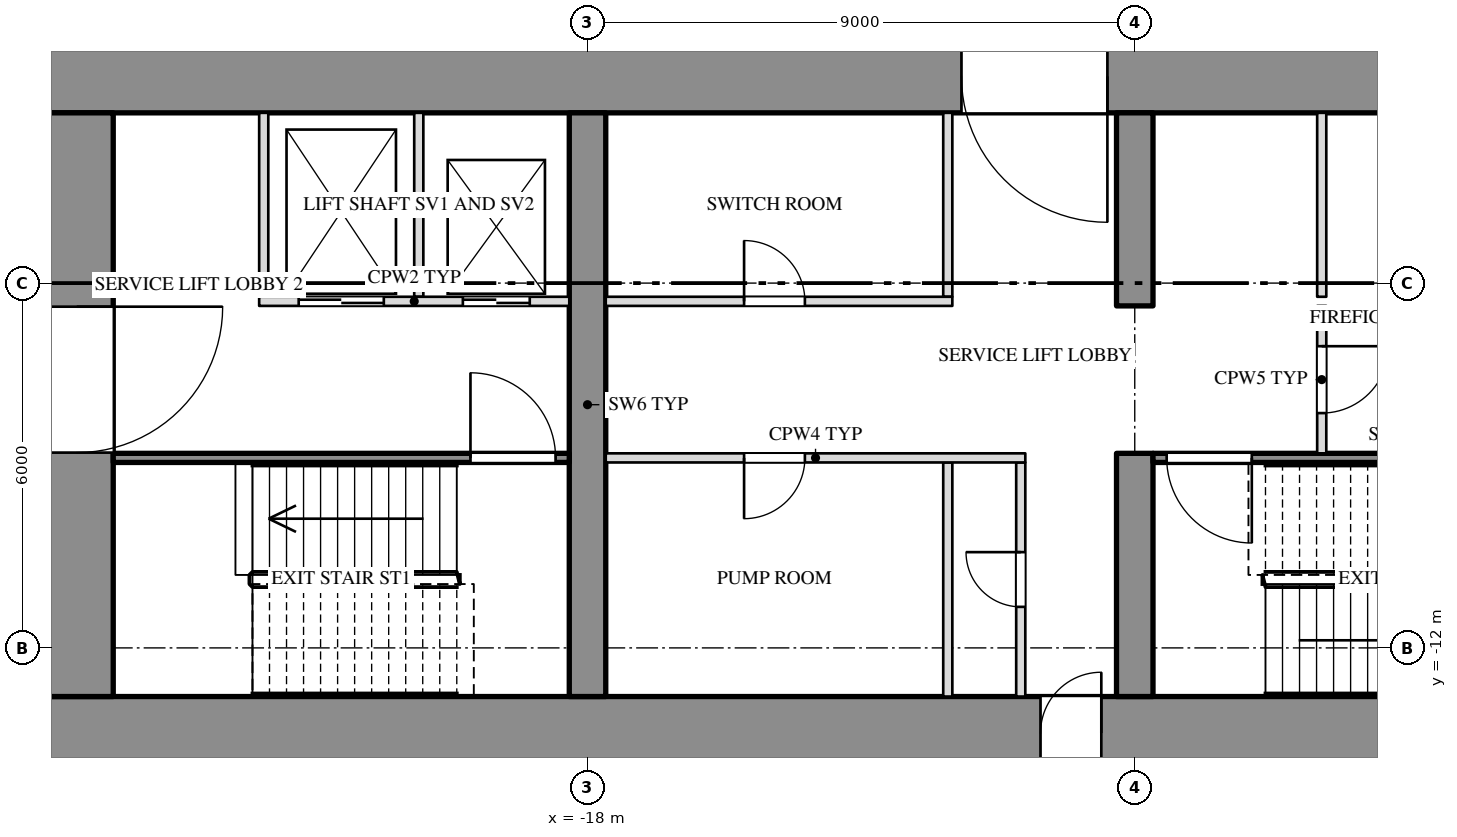
"""IFC4 building model, lengths in metres.
Left out: names, types, materials, properties, quantities, classifications, styles, units other than length and angle.
Written with IfcOpenShell. Run it as: python <this file> out.ifc"""

import sys

from ifc_helpers import new_model, si_unit, direction, frame, frame_2d, origin, place, context, subcontext, project, spatial, rectangle, extrude, element, fill, save


model = new_model("IFC4")
c1 = context("Model", 3, precision=1e-05, world=origin(), true_north=direction((0.0, 1.0)))
c2 = subcontext(c1, "Body", "Model", "MODEL_VIEW")
j1 = project(units=[si_unit("LENGTHUNIT", "METRE"), si_unit("PLANEANGLEUNIT", "RADIAN")], contexts=[c1])
p1 = place(None, origin())
s1 = spatial("IfcSite", under=j1, at=p1, CompositionType="ELEMENT")
p2 = place(p1, origin())
s2 = spatial("IfcBuilding", under=s1, at=p2, CompositionType="ELEMENT")
p3 = place(p2, frame((0.0, 0.0, -12.6)))
s3 = spatial("IfcBuildingStorey", under=s2, at=p3, CompositionType="ELEMENT", Elevation=-12.6)
p4 = place(p3, frame((-27.0, -2.6, 0.0), z_axis=(0.0, 0.0, 1.0), x_axis=(1.0, 0.0, 0.0)))
e1 = element("IfcWall", 1, at=p4, inside=s3, PredefinedType="SHEAR", context=c2, shape_type="SweptSolid", body=[
    extrude(rectangle(XDim=54.0, YDim=1.2, at=frame_2d((27.0, 0.0))), origin(), (0.0, 0.0, 1.0), 3.9),
])
p5 = place(p4, frame((15.15, 0.0, 0.0)))
e2 = element("IfcOpeningElement", 2, at=p5, cuts=e1, PredefinedType="OPENING", context=c2, shape_type="SweptSolid", body=[
    extrude(rectangle(XDim=2.4, YDim=2.1, at=frame_2d((1.2, 1.05))), frame((0.0, 0.612, 0.0), z_axis=(0.0, -1.0, 0.0), x_axis=(1.0, 0.0, 0.0)), (0.0, 0.0, 1.0), 1.224),
])
p6 = place(p4, frame((36.45, 0.0, 0.0)))
e3 = element("IfcOpeningElement", 3, at=p6, cuts=e1, PredefinedType="OPENING", context=c2, shape_type="SweptSolid", body=[
    extrude(rectangle(XDim=2.4, YDim=2.1, at=frame_2d((1.2, 1.05))), frame((0.0, 0.612, 0.0), z_axis=(0.0, -1.0, 0.0), x_axis=(1.0, 0.0, 0.0)), (0.0, 0.0, 1.0), 1.224),
])
p7 = place(p3, frame((-27.0, -13.4, 0.0), z_axis=(0.0, 0.0, 1.0), x_axis=(1.0, 0.0, 0.0)))
e4 = element("IfcWall", 4, at=p7, inside=s3, PredefinedType="SHEAR", context=c2, shape_type="SweptSolid", body=[
    extrude(rectangle(XDim=54.0, YDim=1.2, at=frame_2d((27.0, 0.0))), origin(), (0.0, 0.0, 1.0), 3.9),
])
p8 = place(p7, frame((16.45, 0.0, 0.0)))
e5 = element("IfcOpeningElement", 5, at=p8, cuts=e4, PredefinedType="OPENING", context=c2, shape_type="SweptSolid", body=[
    extrude(rectangle(XDim=1.0, YDim=2.1, at=frame_2d((0.5, 1.05))), frame((0.0, 0.612, 0.0), z_axis=(0.0, -1.0, 0.0), x_axis=(1.0, 0.0, 0.0)), (0.0, 0.0, 1.0), 1.224),
])
p9 = place(p7, frame((36.55, 0.0, 0.0)))
e6 = element("IfcOpeningElement", 6, at=p9, cuts=e4, PredefinedType="OPENING", context=c2, shape_type="SweptSolid", body=[
    extrude(rectangle(XDim=1.0, YDim=2.1, at=frame_2d((0.5, 1.05))), frame((0.0, 0.612, 0.0), z_axis=(0.0, -1.0, 0.0), x_axis=(1.0, 0.0, 0.0)), (0.0, 0.0, 1.0), 1.224),
])
p10 = place(p3, frame((-26.4, -12.8, 0.0), z_axis=(0.0, 0.0, 1.0), x_axis=(0.0, 1.0, 0.0)))
e7 = element("IfcWall", 7, at=p10, inside=s3, PredefinedType="SHEAR", context=c2, shape_type="SweptSolid", body=[
    extrude(rectangle(XDim=9.6, YDim=1.2, at=frame_2d((4.8, 0.0))), origin(), (0.0, 0.0, 1.0), 3.9),
])
p11 = place(p10, frame((4.012, 0.0, 0.0)))
e8 = element("IfcOpeningElement", 8, at=p11, cuts=e7, PredefinedType="OPENING", context=c2, shape_type="SweptSolid", body=[
    extrude(rectangle(XDim=2.4, YDim=2.1, at=frame_2d((1.2, 1.05))), frame((0.0, 0.612, 0.0), z_axis=(0.0, -1.0, 0.0), x_axis=(1.0, 0.0, 0.0)), (0.0, 0.0, 1.0), 1.224),
])
p12 = place(p3, frame((-18.0, -12.8, 0.0), z_axis=(0.0, 0.0, 1.0), x_axis=(0.0, 1.0, 0.0)))
e9 = element("IfcWall", 9, at=p12, inside=s3, PredefinedType="SHEAR", context=c2, shape_type="SweptSolid", body=[
    extrude(rectangle(XDim=9.6, YDim=0.6, at=frame_2d((4.8, 0.0))), origin(), (0.0, 0.0, 1.0), 3.9),
])
p13 = place(p3, frame((-9.0, -12.8, 0.0), z_axis=(0.0, 0.0, 1.0), x_axis=(0.0, 1.0, 0.0)))
e10 = element("IfcWall", 10, at=p13, inside=s3, PredefinedType="SHEAR", context=c2, shape_type="SweptSolid", body=[
    extrude(rectangle(XDim=4.0, YDim=0.6, at=frame_2d((2.0, 0.0))), origin(), (0.0, 0.0, 1.0), 3.9),
])
p14 = place(p3, frame((-9.0, -6.375, 0.0), z_axis=(0.0, 0.0, 1.0), x_axis=(0.0, 1.0, 0.0)))
e11 = element("IfcWall", 11, at=p14, inside=s3, PredefinedType="SHEAR", context=c2, shape_type="SweptSolid", body=[
    extrude(rectangle(XDim=3.175, YDim=0.6, at=frame_2d((1.587, 0.0))), origin(), (0.0, 0.0, 1.0), 3.9),
])
for number, where, z_axis, x_axis in (
    (12, (-20.775, -6.225, 0.0), (0.0, 0.0, 1.0), (0.0, 1.0, 0.0)),
    (13, (-23.325, -6.225, 0.0), (0.0, 0.0, 1.0), (0.0, 1.0, 0.0)),
    (14, (-12.075, -6.225, 0.0), (0.0, 0.0, 1.0), (0.0, 1.0, 0.0)),
    (15, (-5.925, -6.225, 0.0), (0.0, 0.0, 1.0), (0.0, 1.0, 0.0)),
):
    element("IfcWall", number, at=place(p3, frame(where, z_axis=z_axis, x_axis=x_axis)), inside=s3, PredefinedType="PARTITIONING", context=c2, shape_type="SweptSolid", body=[
        extrude(rectangle(XDim=3.025, YDim=0.15, at=frame_2d((1.513, 0.0))), origin(), (0.0, 0.0, 1.0), 3.9),
    ])
p15 = place(p3, frame((-10.875, -12.8, 0.0), z_axis=(0.0, 0.0, 1.0), x_axis=(0.0, 1.0, 0.0)))
e16 = element("IfcWall", 16, at=p15, inside=s3, PredefinedType="PARTITIONING", context=c2, shape_type="SweptSolid", body=[
    extrude(rectangle(XDim=3.85, YDim=0.15, at=frame_2d((1.925, 0.0))), origin(), (0.0, 0.0, 1.0), 3.9),
])
p16 = place(p15, frame((1.475, 0.0, 0.0)))
e17 = element("IfcOpeningElement", 17, at=p16, cuts=e16, PredefinedType="OPENING", context=c2, shape_type="SweptSolid", body=[
    extrude(rectangle(XDim=0.9, YDim=2.1, at=frame_2d((0.45, 1.05))), frame((0.0, 0.087, 0.0), z_axis=(0.0, -1.0, 0.0), x_axis=(1.0, 0.0, 0.0)), (0.0, 0.0, 1.0), 0.174),
])
p17 = place(p3, frame((-12.075, -12.8, 0.0), z_axis=(0.0, 0.0, 1.0), x_axis=(0.0, 1.0, 0.0)))
e18 = element("IfcWall", 18, at=p17, inside=s3, PredefinedType="PARTITIONING", context=c2, shape_type="SweptSolid", body=[
    extrude(rectangle(XDim=3.85, YDim=0.15, at=frame_2d((1.925, 0.0))), origin(), (0.0, 0.0, 1.0), 3.9),
])
p18 = place(p3, frame((-5.925, -8.8, 0.0), z_axis=(0.0, 0.0, 1.0), x_axis=(0.0, 1.0, 0.0)))
e19 = element("IfcWall", 19, at=p18, inside=s3, PredefinedType="PARTITIONING", context=c2, shape_type="SweptSolid", body=[
    extrude(rectangle(XDim=2.425, YDim=0.15, at=frame_2d((1.212, 0.0))), origin(), (0.0, 0.0, 1.0), 3.9),
])
p19 = place(p18, frame((0.662, 0.0, 0.0)))
e20 = element("IfcOpeningElement", 20, at=p19, cuts=e19, PredefinedType="OPENING", context=c2, shape_type="SweptSolid", body=[
    extrude(rectangle(XDim=1.1, YDim=2.1, at=frame_2d((0.55, 1.05))), frame((0.0, 0.087, 0.0), z_axis=(0.0, -1.0, 0.0), x_axis=(1.0, 0.0, 0.0)), (0.0, 0.0, 1.0), 0.174),
])
p20 = place(p3, frame((-23.4, -6.3, 0.0), z_axis=(0.0, 0.0, 1.0), x_axis=(1.0, 0.0, 0.0)))
e21 = element("IfcWall", 21, at=p20, inside=s3, PredefinedType="PARTITIONING", context=c2, shape_type="SweptSolid", body=[
    extrude(rectangle(XDim=5.1, YDim=0.15, at=frame_2d((2.55, 0.0))), origin(), (0.0, 0.0, 1.0), 3.9),
])
p21 = place(p20, frame((0.65, 0.0, 0.0)))
e22 = element("IfcOpeningElement", 22, at=p21, cuts=e21, PredefinedType="OPENING", context=c2, shape_type="SweptSolid", body=[
    extrude(rectangle(XDim=1.4, YDim=2.1, at=frame_2d((0.7, 1.05))), frame((0.0, 0.087, 0.0), z_axis=(0.0, -1.0, 0.0), x_axis=(1.0, 0.0, 0.0)), (0.0, 0.0, 1.0), 0.174),
])
p22 = place(p20, frame((3.35, 0.0, 0.0)))
e23 = element("IfcOpeningElement", 23, at=p22, cuts=e21, PredefinedType="OPENING", context=c2, shape_type="SweptSolid", body=[
    extrude(rectangle(XDim=1.1, YDim=2.1, at=frame_2d((0.55, 1.05))), frame((0.0, 0.087, 0.0), z_axis=(0.0, -1.0, 0.0), x_axis=(1.0, 0.0, 0.0)), (0.0, 0.0, 1.0), 0.174),
])
p23 = place(p3, frame((-17.7, -6.3, 0.0), z_axis=(0.0, 0.0, 1.0), x_axis=(1.0, 0.0, 0.0)))
e24 = element("IfcWall", 24, at=p23, inside=s3, PredefinedType="PARTITIONING", context=c2, shape_type="SweptSolid", body=[
    extrude(rectangle(XDim=5.7, YDim=0.15, at=frame_2d((2.85, 0.0))), origin(), (0.0, 0.0, 1.0), 3.9),
])
p24 = place(p23, frame((2.275, 0.0, 0.0)))
e25 = element("IfcOpeningElement", 25, at=p24, cuts=e24, PredefinedType="OPENING", context=c2, shape_type="SweptSolid", body=[
    extrude(rectangle(XDim=1.0, YDim=2.1, at=frame_2d((0.5, 1.05))), frame((0.0, 0.087, 0.0), z_axis=(0.0, -1.0, 0.0), x_axis=(1.0, 0.0, 0.0)), (0.0, 0.0, 1.0), 0.174),
])
p25 = place(p3, frame((-25.8, -8.875, 0.0), z_axis=(0.0, 0.0, 1.0), x_axis=(1.0, 0.0, 0.0)))
e26 = element("IfcWall", 26, at=p25, inside=s3, PredefinedType="SHEAR", context=c2, shape_type="SweptSolid", body=[
    extrude(rectangle(XDim=7.5, YDim=0.15, at=frame_2d((3.75, 0.0))), origin(), (0.0, 0.0, 1.0), 3.9),
])
p26 = place(p25, frame((5.875, 0.0, 0.0)))
e27 = element("IfcOpeningElement", 27, at=p26, cuts=e26, PredefinedType="OPENING", context=c2, shape_type="SweptSolid", body=[
    extrude(rectangle(XDim=1.4, YDim=2.1, at=frame_2d((0.7, 1.05))), frame((0.0, 0.087, 0.0), z_axis=(0.0, -1.0, 0.0), x_axis=(1.0, 0.0, 0.0)), (0.0, 0.0, 1.0), 0.174),
])
p27 = place(p3, frame((-17.7, -8.875, 0.0), z_axis=(0.0, 0.0, 1.0), x_axis=(1.0, 0.0, 0.0)))
e28 = element("IfcWall", 28, at=p27, inside=s3, PredefinedType="PARTITIONING", context=c2, shape_type="SweptSolid", body=[
    extrude(rectangle(XDim=6.9, YDim=0.15, at=frame_2d((3.45, 0.0))), origin(), (0.0, 0.0, 1.0), 3.9),
])
p28 = place(p27, frame((2.275, 0.0, 0.0)))
e29 = element("IfcOpeningElement", 29, at=p28, cuts=e28, PredefinedType="OPENING", context=c2, shape_type="SweptSolid", body=[
    extrude(rectangle(XDim=1.0, YDim=2.1, at=frame_2d((0.5, 1.05))), frame((0.0, 0.087, 0.0), z_axis=(0.0, -1.0, 0.0), x_axis=(1.0, 0.0, 0.0)), (0.0, 0.0, 1.0), 0.174),
])
p29 = place(p3, frame((-8.7, -8.875, 0.0), z_axis=(0.0, 0.0, 1.0), x_axis=(1.0, 0.0, 0.0)))
e30 = element("IfcWall", 30, at=p29, inside=s3, PredefinedType="SHEAR", context=c2, shape_type="SweptSolid", body=[
    extrude(rectangle(XDim=8.4, YDim=0.15, at=frame_2d((4.2, 0.0))), origin(), (0.0, 0.0, 1.0), 3.9),
])
p30 = place(p29, frame((0.225, 0.0, 0.0)))
e31 = element("IfcOpeningElement", 31, at=p30, cuts=e30, PredefinedType="OPENING", context=c2, shape_type="SweptSolid", body=[
    extrude(rectangle(XDim=1.4, YDim=2.1, at=frame_2d((0.7, 1.05))), frame((0.0, 0.087, 0.0), z_axis=(0.0, -1.0, 0.0), x_axis=(1.0, 0.0, 0.0)), (0.0, 0.0, 1.0), 0.174),
])
p31 = place(p11, origin())
e32 = element("IfcDoor", 32, at=p31, inside=s3, OperationType="DOUBLE_DOOR_SINGLE_SWING", PredefinedType="DOOR", context=c2, shape_type="SweptSolid", body=[
    extrude(rectangle(XDim=2.4, YDim=2.1, at=frame_2d((1.2, 1.05))), frame((0.0, 0.025, 0.0), z_axis=(0.0, -1.0, 0.0), x_axis=(1.0, 0.0, 0.0)), (0.0, 0.0, 1.0), 0.05),
])
fill(e8, e32)
p32 = place(p21, origin())
e33 = element("IfcDoor", 33, at=p32, inside=s3, OperationType="SLIDING_TO_RIGHT", PredefinedType="DOOR", context=c2, shape_type="SweptSolid", body=[
    extrude(rectangle(XDim=1.4, YDim=2.1, at=frame_2d((0.7, 1.05))), frame((0.0, 0.025, 0.0), z_axis=(0.0, -1.0, 0.0), x_axis=(1.0, 0.0, 0.0)), (0.0, 0.0, 1.0), 0.05),
])
fill(e22, e33)
p33 = place(p22, origin())
e34 = element("IfcDoor", 34, at=p33, inside=s3, OperationType="SLIDING_TO_LEFT", PredefinedType="DOOR", context=c2, shape_type="SweptSolid", body=[
    extrude(rectangle(XDim=1.1, YDim=2.1, at=frame_2d((0.55, 1.05))), frame((0.0, 0.025, 0.0), z_axis=(0.0, -1.0, 0.0), x_axis=(1.0, 0.0, 0.0)), (0.0, 0.0, 1.0), 0.05),
])
fill(e23, e34)
p34 = place(p26, origin())
e35 = element("IfcDoor", 35, at=p34, inside=s3, OperationType="DOUBLE_DOOR_SINGLE_SWING", PredefinedType="DOOR", context=c2, shape_type="SweptSolid", body=[
    extrude(rectangle(XDim=1.4, YDim=2.1, at=frame_2d((0.7, 1.05))), frame((0.0, 0.025, 0.0), z_axis=(0.0, -1.0, 0.0), x_axis=(1.0, 0.0, 0.0)), (0.0, 0.0, 1.0), 0.05),
])
fill(e27, e35)
p35 = place(p28, origin())
e36 = element("IfcDoor", 36, at=p35, inside=s3, OperationType="SINGLE_SWING_RIGHT", PredefinedType="DOOR", context=c2, shape_type="SweptSolid", body=[
    extrude(rectangle(XDim=1.0, YDim=2.1, at=frame_2d((0.5, 1.05))), frame((0.0, 0.025, 0.0), z_axis=(0.0, -1.0, 0.0), x_axis=(1.0, 0.0, 0.0)), (0.0, 0.0, 1.0), 0.05),
])
fill(e29, e36)
p36 = place(p24, origin())
e37 = element("IfcDoor", 37, at=p36, inside=s3, OperationType="SINGLE_SWING_LEFT", PredefinedType="DOOR", context=c2, shape_type="SweptSolid", body=[
    extrude(rectangle(XDim=1.0, YDim=2.1, at=frame_2d((0.5, 1.05))), frame((0.0, 0.025, 0.0), z_axis=(0.0, -1.0, 0.0), x_axis=(1.0, 0.0, 0.0)), (0.0, 0.0, 1.0), 0.05),
])
fill(e25, e37)
p37 = place(p16, origin())
e38 = element("IfcDoor", 38, at=p37, inside=s3, OperationType="SINGLE_SWING_RIGHT", PredefinedType="DOOR", context=c2, shape_type="SweptSolid", body=[
    extrude(rectangle(XDim=0.9, YDim=2.1, at=frame_2d((0.45, 1.05))), frame((0.0, 0.025, 0.0), z_axis=(0.0, -1.0, 0.0), x_axis=(1.0, 0.0, 0.0)), (0.0, 0.0, 1.0), 0.05),
])
fill(e17, e38)
p38 = place(p5, origin())
e39 = element("IfcDoor", 39, at=p38, inside=s3, OperationType="DOUBLE_DOOR_SINGLE_SWING", PredefinedType="DOOR", context=c2, shape_type="SweptSolid", body=[
    extrude(rectangle(XDim=2.4, YDim=2.1, at=frame_2d((1.2, 1.05))), frame((0.0, 0.025, 0.0), z_axis=(0.0, -1.0, 0.0), x_axis=(1.0, 0.0, 0.0)), (0.0, 0.0, 1.0), 0.05),
])
fill(e2, e39)
p39 = place(p8, origin())
e40 = element("IfcDoor", 40, at=p39, inside=s3, OperationType="SINGLE_SWING_RIGHT", PredefinedType="DOOR", context=c2, shape_type="SweptSolid", body=[
    extrude(rectangle(XDim=1.0, YDim=2.1, at=frame_2d((0.5, 1.05))), frame((0.0, 0.025, 0.0), z_axis=(0.0, -1.0, 0.0), x_axis=(1.0, 0.0, 0.0)), (0.0, 0.0, 1.0), 0.05),
])
fill(e5, e40)
p40 = place(p30, origin())
e41 = element("IfcDoor", 41, at=p40, inside=s3, OperationType="DOUBLE_DOOR_SINGLE_SWING", PredefinedType="DOOR", context=c2, shape_type="SweptSolid", body=[
    extrude(rectangle(XDim=1.4, YDim=2.1, at=frame_2d((0.7, 1.05))), frame((0.0, 0.025, 0.0), z_axis=(0.0, -1.0, 0.0), x_axis=(1.0, 0.0, 0.0)), (0.0, 0.0, 1.0), 0.05),
])
fill(e31, e41)
p41 = place(p19, origin())
e42 = element("IfcDoor", 42, at=p41, inside=s3, OperationType="SINGLE_SWING_LEFT", PredefinedType="DOOR", context=c2, shape_type="SweptSolid", body=[
    extrude(rectangle(XDim=1.1, YDim=2.1, at=frame_2d((0.55, 1.05))), frame((0.0, 0.025, 0.0), z_axis=(0.0, -1.0, 0.0), x_axis=(1.0, 0.0, 0.0)), (0.0, 0.0, 1.0), 0.05),
])
fill(e20, e42)
save(model, sys.argv[1])
